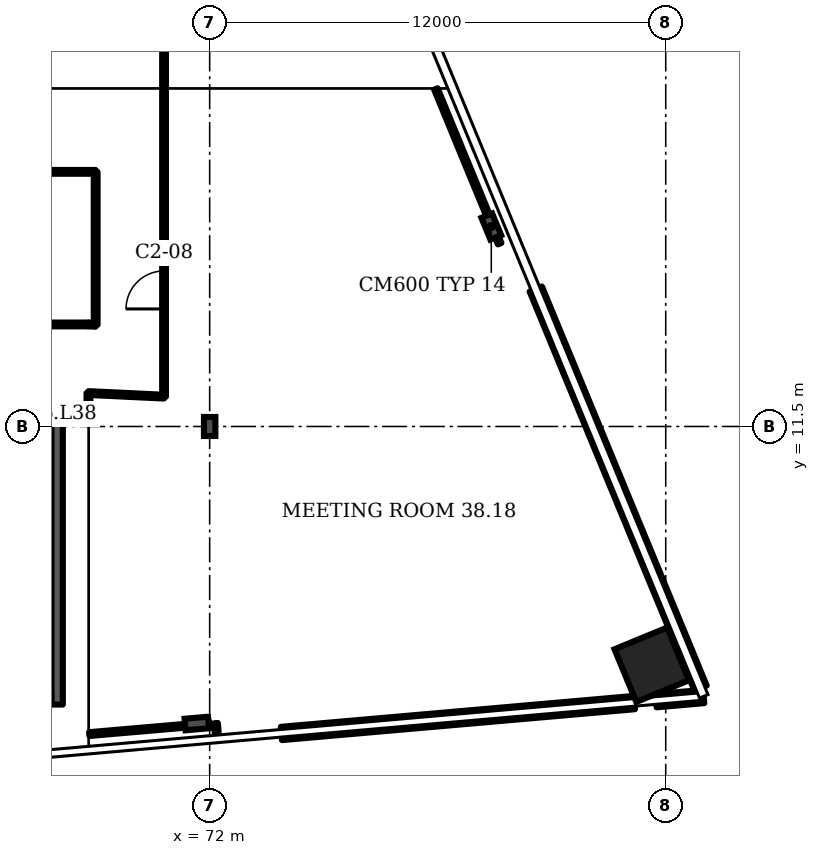
"""IFC4 building model, lengths in metres.
Left out: names, types, materials, properties, quantities, classifications, styles, units other than length and angle.
Written with IfcOpenShell. Run it as: python <this file> out.ifc"""

import sys

from ifc_helpers import new_model, si_unit, direction, frame, frame_2d, origin, origin_2d, place, context, subcontext, project, spatial, rectangle, i_section, extrude, element, fill, save


model = new_model("IFC4")
c1 = context("Model", 3, precision=1e-05, world=origin(), true_north=direction((0.0, 1.0)))
c2 = subcontext(c1, "Body", "Model", "MODEL_VIEW")
j1 = project(units=[si_unit("LENGTHUNIT", "METRE"), si_unit("PLANEANGLEUNIT", "RADIAN")], contexts=[c1])
p1 = place(None, origin())
s1 = spatial("IfcSite", under=j1, at=p1, CompositionType="ELEMENT")
p2 = place(p1, origin())
s2 = spatial("IfcBuilding", under=s1, at=p2, CompositionType="ELEMENT")
p3 = place(p2, frame((0.0, 0.0, 159.1)))
s3 = spatial("IfcBuildingStorey", under=s2, at=p3, CompositionType="ELEMENT", Elevation=159.1)
p4 = place(p3, frame((83.633, 5.231, 0.0), z_axis=(0.0, 0.0, 1.0), x_axis=(-0.381602, 0.924325, 0.0)))
e1 = element("IfcColumn", 1, at=p4, inside=s3, PredefinedType="COLUMN", context=c2, shape_type="SweptSolid", body=[
    extrude(rectangle(XDim=1.5, YDim=1.5, at=origin_2d()), origin(), (0.0, 0.0, 1.0), 3.6),
])
for number, where, z_axis, x_axis in (
    (2, (71.662, 3.685, 0.0), (0.0, 0.0, 1.0), (0.087, -0.996, 0.0)),
    (3, (79.41, 16.762, 0.0), (0.0, 0.0, 1.0), (0.924, 0.382, 0.0)),
):
    element("IfcColumn", number, at=place(p3, frame(where, z_axis=z_axis, x_axis=x_axis)), inside=s3, PredefinedType="COLUMN", context=c2, shape_type="SweptSolid", body=[
        extrude(i_section(OverallWidth=0.305, OverallDepth=0.62, WebThickness=0.021, FlangeThickness=0.04, FilletRadius=0.027, at=origin_2d()), origin(), (0.0, 0.0, 1.0), 3.6),
    ])
p5 = place(p3, frame((72.0, 11.5, 0.0), z_axis=(0.0, 0.0, 1.0), x_axis=(1.0, 0.0, 0.0)))
e4 = element("IfcColumn", 4, at=p5, inside=s3, PredefinedType="COLUMN", context=c2, shape_type="SweptSolid", body=[
    extrude(i_section(OverallWidth=0.3, OverallDepth=0.5, WebThickness=0.014, FlangeThickness=0.028, FilletRadius=0.027, at=origin_2d()), origin(), (0.0, 0.0, 1.0), 3.6),
])
p6 = place(p3, frame((73.887, 3.423, 0.0), z_axis=(0.0, 0.0, 1.0), x_axis=(0.996197, 0.087145, 0.0)))
e5 = element("IfcWall", 5, at=p6, inside=s3, PredefinedType="SOLIDWALL", context=c2, shape_type="SweptSolid", body=[
    extrude(rectangle(XDim=9.323, YDim=0.35, at=frame_2d((4.662, 0.0))), origin(), (0.0, 0.0, 1.0), 1.0),
])
p7 = place(p3, frame((83.745, 4.285, 0.0), z_axis=(0.0, 0.0, 1.0), x_axis=(0.996198, 0.087148, 0.0)))
e6 = element("IfcWall", 6, at=p7, inside=s3, PredefinedType="SOLIDWALL", context=c2, shape_type="SweptSolid", body=[
    extrude(rectangle(XDim=1.261, YDim=0.35, at=frame_2d((0.63, 0.0))), origin(), (0.0, 0.0, 1.0), 1.0),
])
p8 = place(p3, frame((84.916, 4.616, 0.0), z_axis=(0.0, 0.0, 1.0), x_axis=(-0.381598, 0.924328, 0.0)))
e7 = element("IfcWall", 7, at=p8, inside=s3, PredefinedType="SOLIDWALL", context=c2, shape_type="SweptSolid", body=[
    extrude(rectangle(XDim=11.361, YDim=0.35, at=frame_2d((5.68, 0.0))), origin(), (0.0, 0.0, 1.0), 1.0),
])
p9 = place(p3, frame((63.786, 11.834, 0.0), z_axis=(0.0, 0.0, 1.0), x_axis=(1.0, 0.0, 0.0)))
e8 = element("IfcWall", 8, at=p9, inside=s3, PredefinedType="SHEAR", context=c2, shape_type="SweptSolid", body=[
    extrude(rectangle(XDim=4.35, YDim=0.3, at=frame_2d((2.175, 0.0))), origin(), (0.0, 0.0, 1.0), 3.2),
])
p10 = place(p9, frame((1.575, 0.0, 0.0)))
e9 = element("IfcOpeningElement", 9, at=p10, cuts=e8, PredefinedType="OPENING", context=c2, shape_type="SweptSolid", body=[
    extrude(rectangle(XDim=1.2, YDim=2.1, at=frame_2d((0.6, 1.05))), frame((0.0, 0.16, 0.0), z_axis=(0.0, -1.0, 0.0), x_axis=(1.0, 0.0, 0.0)), (0.0, 0.0, 1.0), 0.32),
])
p11 = place(p3, frame((61.81, 14.185, 0.0), z_axis=(0.0, 0.0, 1.0), x_axis=(1.0, 0.0, 0.0)))
e10 = element("IfcWall", 10, at=p11, inside=s3, PredefinedType="PARTITIONING", context=c2, shape_type="SweptSolid", body=[
    extrude(rectangle(XDim=7.0, YDim=0.1, at=frame_2d((3.5, 0.0))), origin(), (0.0, 0.0, 1.0), 3.2),
])
p12 = place(p3, frame((63.905, 18.2, 0.0), z_axis=(0.0, 0.0, 1.0), x_axis=(1.0, 0.0, 0.0)))
e11 = element("IfcWall", 11, at=p12, inside=s3, PredefinedType="PARTITIONING", context=c2, shape_type="SweptSolid", body=[
    extrude(rectangle(XDim=5.095, YDim=0.1, at=frame_2d((2.547, 0.0))), origin(), (0.0, 0.0, 1.0), 3.2),
])
p13 = place(p3, frame((68.81, 12.004, 0.0), z_axis=(0.0, 0.0, 1.0), x_axis=(0.0, 1.0, 0.0)))
e12 = element("IfcWall", 12, at=p13, inside=s3, PredefinedType="PARTITIONING", context=c2, shape_type="SweptSolid", body=[
    extrude(rectangle(XDim=0.376, YDim=0.1, at=frame_2d((0.188, 0.0))), origin(), (0.0, 0.0, 1.0), 3.2),
])
p14 = place(p3, frame((68.831, 3.407, 0.0), z_axis=(0.0, 0.0, 1.0), x_axis=(0.996308, 0.085898, 0.0)))
e13 = element("IfcWall", 13, at=p14, inside=s3, PredefinedType="PARTITIONING", context=c2, shape_type="SweptSolid", body=[
    extrude(rectangle(XDim=3.18, YDim=0.1, at=frame_2d((1.59, 0.0))), origin(), (0.0, 0.0, 1.0), 2.58),
])
p15 = place(p3, frame((69.0, 14.175, 0.0), z_axis=(0.0, 0.0, 1.0), x_axis=(-0.99861, 0.052626, 0.0)))
e14 = element("IfcWall", 14, at=p15, inside=s3, PredefinedType="PARTITIONING", context=c2, shape_type="SweptSolid", body=[
    extrude(rectangle(XDim=0.19, YDim=0.1, at=frame_2d((0.095, 0.0))), origin(), (0.0, 0.0, 1.0), 3.2),
])
p16 = place(p3, frame((69.0, 14.175, 0.0), z_axis=(0.0, 0.0, 1.0), x_axis=(0.0, 1.0, 0.0)))
e15 = element("IfcWall", 15, at=p16, inside=s3, PredefinedType="PARTITIONING", context=c2, shape_type="SweptSolid", body=[
    extrude(rectangle(XDim=4.025, YDim=0.1, at=frame_2d((2.012, 0.0))), origin(), (0.0, 0.0, 1.0), 3.2),
])
p17 = place(p3, frame((70.8, 12.285, 0.0), z_axis=(0.0, 0.0, 1.0), x_axis=(-0.998864, 0.04767, 0.0)))
e16 = element("IfcWall", 16, at=p17, inside=s3, PredefinedType="PARTITIONING", context=c2, shape_type="SweptSolid", body=[
    extrude(rectangle(XDim=1.992, YDim=0.1, at=frame_2d((0.996, 0.0))), origin(), (0.0, 0.0, 1.0), 3.2),
])
p18 = place(p3, frame((70.8, 12.285, 0.0), z_axis=(0.0, 0.0, 1.0), x_axis=(0.0, 1.0, 0.0)))
e17 = element("IfcWall", 17, at=p18, inside=s3, PredefinedType="PARTITIONING", context=c2, shape_type="SweptSolid", body=[
    extrude(rectangle(XDim=9.44, YDim=0.1, at=frame_2d((4.72, 0.0))), origin(), (0.0, 0.0, 1.0), 3.2),
])
p19 = place(p18, frame((2.308, 0.0, 0.0)))
e18 = element("IfcOpeningElement", 18, at=p19, cuts=e17, PredefinedType="OPENING", context=c2, shape_type="SweptSolid", body=[
    extrude(rectangle(XDim=1.0, YDim=2.1, at=frame_2d((0.5, 1.05))), frame((0.0, 0.06, 0.0), z_axis=(0.0, -1.0, 0.0), x_axis=(1.0, 0.0, 0.0)), (0.0, 0.0, 1.0), 0.12),
])
p20 = place(p3, frame((72.198, 3.3, 0.0), z_axis=(0.0, 0.0, 1.0), x_axis=(-0.083759, 0.996486, 0.0)))
e19 = element("IfcWall", 19, at=p20, inside=s3, PredefinedType="PARTITIONING", context=c2, shape_type="SweptSolid", body=[
    extrude(rectangle(XDim=0.396, YDim=0.1, at=frame_2d((0.198, 0.0))), origin(), (0.0, 0.0, 1.0), 3.2),
])
p21 = place(p3, frame((79.63, 16.31, 0.0), z_axis=(0.0, 0.0, 1.0), x_axis=(-0.380933, 0.9246, 0.0)))
e20 = element("IfcWall", 20, at=p21, inside=s3, PredefinedType="PARTITIONING", context=c2, shape_type="SweptSolid", body=[
    extrude(rectangle(XDim=4.402, YDim=0.1, at=frame_2d((2.201, 0.0))), origin(), (0.0, 0.0, 1.0), 2.58),
])
p22 = place(p3, frame((67.986, 4.184, 0.0), z_axis=(0.0, 0.0, 1.0), x_axis=(0.0, 1.0, 0.0)))
e21 = element("IfcWall", 21, at=p22, inside=s3, PredefinedType="SHEAR", context=c2, shape_type="SweptSolid", body=[
    extrude(rectangle(XDim=7.5, YDim=0.3, at=frame_2d((3.75, 0.0))), origin(), (0.0, 0.0, 1.0), 3.2),
])
p23 = place(p19, origin())
e22 = element("IfcDoor", 22, at=p23, inside=s3, OperationType="SINGLE_SWING_LEFT", PredefinedType="DOOR", context=c2, shape_type="SweptSolid", body=[
    extrude(rectangle(XDim=1.0, YDim=2.1, at=frame_2d((0.5, 1.05))), frame((0.0, 0.025, 0.0), z_axis=(0.0, -1.0, 0.0), x_axis=(1.0, 0.0, 0.0)), (0.0, 0.0, 1.0), 0.05),
])
fill(e18, e22)
save(model, sys.argv[1])
